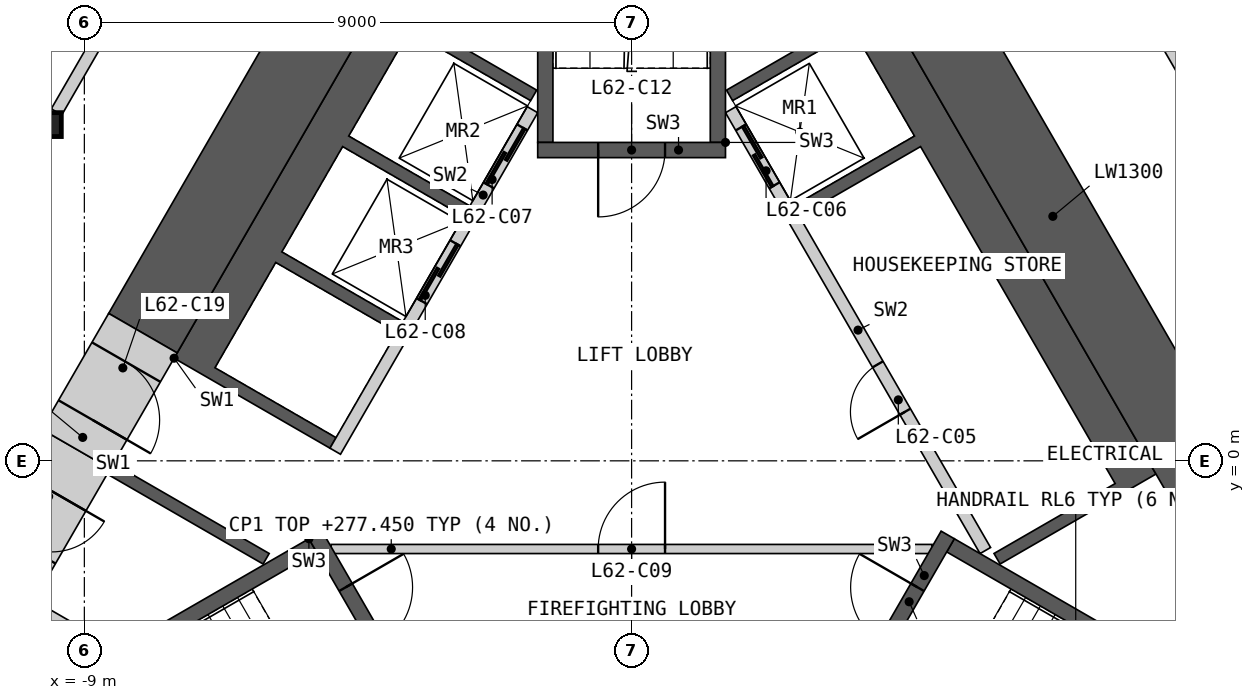
"""IFC4 building model, lengths in metres.
Left out: names, types, materials, properties, quantities, classifications, styles, units other than length and angle.
Written with IfcOpenShell. Run it as: python <this file> out.ifc"""

import sys

from ifc_helpers import new_model, si_unit, direction, frame, frame_2d, origin, origin_2d, place, context, subcontext, project, spatial, polyline, rectangle, i_section, outline, extrude, element, fill, save


model = new_model("IFC4")
c1 = context("Model", 3, precision=1e-05, world=origin(), true_north=direction((0.0, 1.0)))
c2 = subcontext(c1, "Body", "Model", "MODEL_VIEW")
j1 = project(units=[si_unit("LENGTHUNIT", "METRE"), si_unit("PLANEANGLEUNIT", "RADIAN")], contexts=[c1])
p1 = place(None, origin())
s1 = spatial("IfcSite", under=j1, at=p1, CompositionType="ELEMENT")
p2 = place(p1, origin())
s2 = spatial("IfcBuilding", under=s1, at=p2, CompositionType="ELEMENT")
p3 = place(p2, frame((0.0, 0.0, 274.2)))
s3 = spatial("IfcBuildingStorey", under=s2, at=p3, CompositionType="ELEMENT", Elevation=274.2)
p4 = place(p3, frame((-9.578, 5.53, 0.0), z_axis=(0.0, 0.0, 1.0), x_axis=(1.0, 0.0, 0.0)))
e1 = element("IfcColumn", 1, at=p4, inside=s3, PredefinedType="COLUMN", context=c2, shape_type="SweptSolid", body=[
    extrude(i_section(OverallWidth=0.399, OverallDepth=0.393, WebThickness=0.023, FlangeThickness=0.037, at=origin_2d()), origin(), (0.0, 0.0, 1.0), 3.6),
])
p5 = place(p3, origin())
e2 = element("IfcWall", 2, at=p5, inside=s3, PredefinedType="SHEAR", context=c2, shape_type="SweptSolid", body=[
    extrude(outline(polyline([(4.124, 7.577), (8.624, -0.217), (8.231, -0.444), (6.061, -1.697), (5.96, -1.524), (7.952, -0.374), (4.752, 5.169), (2.76, 4.019), (2.66, 4.192), (4.652, 5.342), (3.652, 7.074), (1.66, 5.924), (1.561, 6.097), (3.731, 7.35), (4.124, 7.577)])), origin(), (0.0, 0.0, 1.0), 3.25),
])
p6 = place(p3, frame((5.817, -1.476, 0.0), z_axis=(0.0, 0.0, 1.0), x_axis=(-0.500002616675, 0.866023893041, 0.0)))
e3 = element("IfcWall", 3, at=p6, inside=s3, PredefinedType="SOLIDWALL", context=c2, shape_type="SweptSolid", body=[
    extrude(rectangle(XDim=8.373, YDim=0.2, at=frame_2d((4.187, 0.0))), origin(), (0.0, 0.0, 1.0), 3.25),
])
p7 = place(p6, frame((2.637, 0.0, 0.0)))
e4 = element("IfcOpeningElement", 4, at=p7, cuts=e3, PredefinedType="OPENING", context=c2, shape_type="SweptSolid", body=[
    extrude(rectangle(XDim=0.9, YDim=2.1, at=frame_2d((0.45, 1.05))), frame((0.0, 0.11, 0.0), z_axis=(0.0, -1.0, 0.0), x_axis=(1.0, 0.0, 0.0)), (0.0, 0.0, 1.0), 0.22),
])
p8 = place(p6, frame((6.937, 0.0, 0.0)))
e5 = element("IfcOpeningElement", 5, at=p8, cuts=e3, PredefinedType="OPENING", context=c2, shape_type="SweptSolid", body=[
    extrude(rectangle(XDim=1.1, YDim=2.1, at=frame_2d((0.55, 1.05))), frame((0.0, 0.11, 0.0), z_axis=(0.0, -1.0, 0.0), x_axis=(1.0, 0.0, 0.0)), (0.0, 0.0, 1.0), 0.22),
])
p9 = place(p3, origin())
e6 = element("IfcWall", 6, at=p9, inside=s3, PredefinedType="SHEAR", context=c2, shape_type="SweptSolid", body=[
    extrude(outline(polyline([(-7.524, 1.688), (-4.124, 7.577), (-3.731, 7.35), (-1.561, 6.097), (-1.66, 5.924), (-3.652, 7.074), (-4.652, 5.342), (-2.66, 4.192), (-2.76, 4.019), (-4.752, 5.169), (-5.752, 3.437), (-3.76, 2.287), (-3.861, 2.113), (-5.852, 3.263), (-6.852, 1.531), (-4.861, 0.381), (-4.96, 0.208), (-7.131, 1.461), (-7.524, 1.688)])), origin(), (0.0, 0.0, 1.0), 3.25),
])
p10 = place(p3, origin())
e7 = element("IfcWall", 7, at=p10, inside=s3, PredefinedType="SHEAR", context=c2, shape_type="SweptSolid", body=[
    extrude(outline(polyline([(-8.524, -0.044), (-8.131, -0.271), (-5.96, -1.524), (-6.061, -1.697), (-8.231, -0.444), (-8.624, -0.217), (-8.524, -0.044)])), origin(), (0.0, 0.0, 1.0), 3.25),
])
p11 = place(p3, frame((-1.631, 5.776, 0.0), z_axis=(0.0, 0.0, 1.0), x_axis=(-0.499992876559, -0.866029516466, 0.0)))
e8 = element("IfcWall", 8, at=p11, inside=s3, PredefinedType="SOLIDWALL", context=c2, shape_type="SweptSolid", body=[
    extrude(rectangle(XDim=6.486, YDim=0.2, at=frame_2d((3.243, 0.0))), origin(), (0.0, 0.0, 1.0), 3.25),
])
p12 = place(p11, frame((0.337, 0.0, 0.0)))
e9 = element("IfcOpeningElement", 9, at=p12, cuts=e8, PredefinedType="OPENING", context=c2, shape_type="SweptSolid", body=[
    extrude(rectangle(XDim=1.1, YDim=2.1, at=frame_2d((0.55, 1.05))), frame((0.0, 0.11, 0.0), z_axis=(0.0, -1.0, 0.0), x_axis=(1.0, 0.0, 0.0)), (0.0, 0.0, 1.0), 0.22),
])
p13 = place(p11, frame((2.537, 0.0, 0.0)))
e10 = element("IfcOpeningElement", 10, at=p13, cuts=e8, PredefinedType="OPENING", context=c2, shape_type="SweptSolid", body=[
    extrude(rectangle(XDim=1.1, YDim=2.1, at=frame_2d((0.55, 1.05))), frame((0.0, 0.11, 0.0), z_axis=(0.0, -1.0, 0.0), x_axis=(1.0, 0.0, 0.0)), (0.0, 0.0, 1.0), 0.22),
])
p14 = place(p3, frame((-4.941, -1.45, 0.0), z_axis=(0.0, 0.0, 1.0), x_axis=(1.0, 0.0, 0.0)))
e11 = element("IfcWall", 11, at=p14, inside=s3, PredefinedType="PARTITIONING", context=c2, shape_type="SweptSolid", body=[
    extrude(rectangle(XDim=9.882, YDim=0.15, at=frame_2d((4.941, 0.0))), origin(), (0.0, 0.0, 1.0), 3.25),
])
p15 = place(p14, frame((4.391, 0.0, 0.0)))
e12 = element("IfcOpeningElement", 12, at=p15, cuts=e11, PredefinedType="OPENING", context=c2, shape_type="SweptSolid", body=[
    extrude(rectangle(XDim=1.1, YDim=2.1, at=frame_2d((0.55, 1.05))), frame((0.0, 0.085, 0.0), z_axis=(0.0, -1.0, 0.0), x_axis=(1.0, 0.0, 0.0)), (0.0, 0.0, 1.0), 0.17),
])
p16 = place(p3, origin())
e13 = element("IfcWall", 13, at=p16, inside=s3, PredefinedType="SHEAR", context=c2, shape_type="SweptSolid", body=[
    extrude(outline(polyline([(-5.307, -1.281), (-10.374, -4.206), (-10.032, -4.298), (-5.182, -1.498), (-5.307, -1.281)])), origin(), (0.0, 0.0, 1.0), 3.25),
])
p17 = place(p3, frame((-5.199, -1.219, 0.0), z_axis=(0.0, 0.0, 1.0), x_axis=(0.499982516597, -0.866035497597, 0.0)))
e14 = element("IfcWall", 14, at=p17, inside=s3, PredefinedType="SHEAR", context=c2, shape_type="SweptSolid", body=[
    extrude(rectangle(XDim=3.088, YDim=0.25, at=frame_2d((1.544, 0.0))), origin(), (0.0, 0.0, 1.0), 3.25),
])
p18 = place(p17, frame((0.994, 0.0, 0.0)))
e15 = element("IfcOpeningElement", 15, at=p18, cuts=e14, PredefinedType="OPENING", context=c2, shape_type="SweptSolid", body=[
    extrude(rectangle(XDim=1.1, YDim=2.1, at=frame_2d((0.55, 1.05))), frame((0.0, 0.135, 0.0), z_axis=(0.0, -1.0, 0.0), x_axis=(1.0, 0.0, 0.0)), (0.0, 0.0, 1.0), 0.27),
])
p19 = place(p3, origin())
e16 = element("IfcWall", 16, at=p19, inside=s3, PredefinedType="SHEAR", context=c2, shape_type="SweptSolid", body=[
    extrude(outline(polyline([(10.032, -4.298), (10.374, -4.206), (5.307, -1.281), (5.182, -1.498), (10.032, -4.298)])), origin(), (0.0, 0.0, 1.0), 3.25),
])
p20 = place(p3, frame((3.655, -3.893, 0.0), z_axis=(0.0, 0.0, 1.0), x_axis=(0.499982516597, 0.866035497597, 0.0)))
e17 = element("IfcWall", 17, at=p20, inside=s3, PredefinedType="SHEAR", context=c2, shape_type="SweptSolid", body=[
    extrude(rectangle(XDim=3.088, YDim=0.25, at=frame_2d((1.544, 0.0))), origin(), (0.0, 0.0, 1.0), 3.25),
])
p21 = place(p20, frame((0.994, 0.0, 0.0)))
e18 = element("IfcOpeningElement", 18, at=p21, cuts=e17, PredefinedType="OPENING", context=c2, shape_type="SweptSolid", body=[
    extrude(rectangle(XDim=1.1, YDim=2.1, at=frame_2d((0.55, 1.05))), frame((0.0, 0.135, 0.0), z_axis=(0.0, -1.0, 0.0), x_axis=(1.0, 0.0, 0.0)), (0.0, 0.0, 1.0), 0.27),
])
p22 = place(p3, origin())
e19 = element("IfcWall", 19, at=p22, inside=s3, PredefinedType="SHEAR", context=c2, shape_type="SweptSolid", body=[
    extrude(outline(polyline([(1.544, 5.237), (1.544, 11.087), (1.294, 10.837), (1.294, 5.237), (1.544, 5.237)])), origin(), (0.0, 0.0, 1.0), 3.25),
])
p23 = place(p3, origin())
e20 = element("IfcWall", 20, at=p23, inside=s3, PredefinedType="SHEAR", context=c2, shape_type="SweptSolid", body=[
    extrude(outline(polyline([(-1.294, 10.837), (-1.544, 11.087), (-1.544, 5.237), (-1.294, 5.237), (-1.294, 10.837)])), origin(), (0.0, 0.0, 1.0), 3.25),
])
p24 = place(p3, frame((1.544, 5.112, 0.0), z_axis=(0.0, 0.0, 1.0), x_axis=(-1.0, 0.0, 0.0)))
e21 = element("IfcWall", 21, at=p24, inside=s3, PredefinedType="SHEAR", context=c2, shape_type="SweptSolid", body=[
    extrude(rectangle(XDim=3.088, YDim=0.25, at=frame_2d((1.544, 0.0))), origin(), (0.0, 0.0, 1.0), 3.25),
])
p25 = place(p24, frame((0.994, 0.0, 0.0)))
e22 = element("IfcOpeningElement", 22, at=p25, cuts=e21, PredefinedType="OPENING", context=c2, shape_type="SweptSolid", body=[
    extrude(rectangle(XDim=1.1, YDim=2.1, at=frame_2d((0.55, 1.05))), frame((0.0, 0.135, 0.0), z_axis=(0.0, -1.0, 0.0), x_axis=(1.0, 0.0, 0.0)), (0.0, 0.0, 1.0), 0.27),
])
p26 = place(p3, frame((-9.862, -2.361, 0.0), z_axis=(0.0, 0.0, 1.0), x_axis=(0.865990094875, -0.500061151839, 0.0)))
e23 = element("IfcWall", 23, at=p26, inside=s3, PredefinedType="PARTITIONING", context=c2, shape_type="SweptSolid", body=[
    extrude(rectangle(XDim=1.56, YDim=0.15, at=frame_2d((0.78, 0.0))), origin(), (0.0, 0.0, 1.0), 3.25),
])
p27 = place(p3, frame((10.062, -1.408, 0.0), z_axis=(0.0, 0.0, 1.0), x_axis=(-0.500000545805, 0.866025088663, 0.0)))
e24 = element("IfcWall", 24, at=p27, inside=s3, PredefinedType="SHEAR", context=c2, shape_type="SweptSolid", body=[
    extrude(rectangle(XDim=12.539, YDim=1.3, at=frame_2d((6.27, 0.0))), origin(), (0.0, 0.0, 1.0), 3.25),
])
p28 = place(p3, frame((-3.812, 9.418, 0.0), z_axis=(0.0, 0.0, 1.0), x_axis=(-0.499995037753, -0.86602826872, 0.0)))
e25 = element("IfcWall", 25, at=p28, inside=s3, PredefinedType="SHEAR", context=c2, shape_type="SweptSolid", body=[
    extrude(rectangle(XDim=8.451, YDim=1.3, at=frame_2d((4.225, 0.0))), origin(), (0.0, 0.0, 1.0), 3.25),
])
p29 = place(p3, frame((-9.137, 0.195, 0.0), z_axis=(0.0, 0.0, 1.0), x_axis=(-0.500009943768, -0.866019662671, 0.0)))
e26 = element("IfcWall", 26, at=p29, inside=s3, PredefinedType="SHEAR", context=c2, shape_type="SweptSolid", body=[
    extrude(rectangle(XDim=2.401, YDim=1.3, at=frame_2d((1.201, 0.0))), origin(), (0.0, 0.0, 1.0), 3.25),
])
p30 = place(p29, frame((0.8, 0.0, 0.0)))
e27 = element("IfcOpeningElement", 27, at=p30, cuts=e26, PredefinedType="OPENING", context=c2, shape_type="SweptSolid", body=[
    extrude(rectangle(XDim=1.0, YDim=2.1, at=frame_2d((0.5, 1.05))), frame((0.0, 0.66, 0.0), z_axis=(0.0, -1.0, 0.0), x_axis=(1.0, 0.0, 0.0)), (0.0, 0.0, 1.0), 1.32),
])
p31 = place(p3, frame((-8.037, 2.1, 0.0), z_axis=(0.0, 0.0, 1.0), x_axis=(-0.50002983664, -0.866008176907, 0.0)))
e28 = element("IfcWall", 28, at=p31, inside=s3, PredefinedType="SHEAR", context=c2, shape_type="SweptSolid", body=[
    extrude(rectangle(XDim=2.2, YDim=1.3, at=frame_2d((1.1, 0.0))), origin(), (0.0, 0.0, 1.0), 3.25),
])
p32 = place(p31, frame((0.55, 0.0, 0.0)))
e29 = element("IfcOpeningElement", 29, at=p32, cuts=e28, PredefinedType="OPENING", context=c2, shape_type="SweptSolid", body=[
    extrude(rectangle(XDim=1.1, YDim=2.1, at=frame_2d((0.55, 1.05))), frame((0.0, 0.66, 0.0), z_axis=(0.0, -1.0, 0.0), x_axis=(1.0, 0.0, 0.0)), (0.0, 0.0, 1.0), 1.32),
])
for number, where, z_axis, x_axis in (
    (30, (4.91, 13.616, 0.0), (0.0, 0.0, 1.0), (0.5, -0.866, 0.0)),
    (31, (-9.458, 5.74, 0.0), (0.0, 0.0, 1.0), (0.5, 0.866, 0.0)),
):
    element("IfcWall", number, at=place(p3, frame(where, z_axis=z_axis, x_axis=x_axis)), inside=s3, PredefinedType="PARTITIONING", context=c2, shape_type="SweptSolid", body=[
        extrude(rectangle(XDim=9.095, YDim=0.2, at=frame_2d((4.547, 0.0))), origin(), (0.0, 0.0, 1.0), 3.25),
    ])
p33 = place(p7, origin())
e32 = element("IfcDoor", 32, at=p33, inside=s3, OperationType="SINGLE_SWING_LEFT", PredefinedType="DOOR", context=c2, shape_type="SweptSolid", body=[
    extrude(rectangle(XDim=0.9, YDim=2.1, at=frame_2d((0.45, 1.05))), frame((0.0, 0.025, 0.0), z_axis=(0.0, -1.0, 0.0), x_axis=(1.0, 0.0, 0.0)), (0.0, 0.0, 1.0), 0.05),
])
fill(e4, e32)
p34 = place(p8, origin())
e33 = element("IfcDoor", 33, at=p34, inside=s3, OperationType="SLIDING_TO_LEFT", PredefinedType="DOOR", context=c2, shape_type="SweptSolid", body=[
    extrude(rectangle(XDim=1.1, YDim=2.1, at=frame_2d((0.55, 1.05))), frame((0.0, 0.025, 0.0), z_axis=(0.0, -1.0, 0.0), x_axis=(1.0, 0.0, 0.0)), (0.0, 0.0, 1.0), 0.05),
])
fill(e5, e33)
p35 = place(p12, origin())
e34 = element("IfcDoor", 34, at=p35, inside=s3, OperationType="SLIDING_TO_LEFT", PredefinedType="DOOR", context=c2, shape_type="SweptSolid", body=[
    extrude(rectangle(XDim=1.1, YDim=2.1, at=frame_2d((0.55, 1.05))), frame((0.0, 0.025, 0.0), z_axis=(0.0, -1.0, 0.0), x_axis=(1.0, 0.0, 0.0)), (0.0, 0.0, 1.0), 0.05),
])
fill(e9, e34)
p36 = place(p13, origin())
e35 = element("IfcDoor", 35, at=p36, inside=s3, OperationType="SLIDING_TO_LEFT", PredefinedType="DOOR", context=c2, shape_type="SweptSolid", body=[
    extrude(rectangle(XDim=1.1, YDim=2.1, at=frame_2d((0.55, 1.05))), frame((0.0, 0.025, 0.0), z_axis=(0.0, -1.0, 0.0), x_axis=(1.0, 0.0, 0.0)), (0.0, 0.0, 1.0), 0.05),
])
fill(e10, e35)
p37 = place(p15, origin())
e36 = element("IfcDoor", 36, at=p37, inside=s3, OperationType="SINGLE_SWING_RIGHT", PredefinedType="DOOR", context=c2, shape_type="SweptSolid", body=[
    extrude(rectangle(XDim=1.1, YDim=2.1, at=frame_2d((0.55, 1.05))), frame((0.0, 0.025, 0.0), z_axis=(0.0, -1.0, 0.0), x_axis=(1.0, 0.0, 0.0)), (0.0, 0.0, 1.0), 0.05),
])
fill(e12, e36)
p38 = place(p18, origin())
e37 = element("IfcDoor", 37, at=p38, inside=s3, OperationType="SINGLE_SWING_LEFT", PredefinedType="DOOR", context=c2, shape_type="SweptSolid", body=[
    extrude(rectangle(XDim=1.1, YDim=2.1, at=frame_2d((0.55, 1.05))), frame((0.0, 0.025, 0.0), z_axis=(0.0, -1.0, 0.0), x_axis=(1.0, 0.0, 0.0)), (0.0, 0.0, 1.0), 0.05),
])
fill(e15, e37)
p39 = place(p21, origin())
e38 = element("IfcDoor", 38, at=p39, inside=s3, OperationType="SINGLE_SWING_RIGHT", PredefinedType="DOOR", context=c2, shape_type="SweptSolid", body=[
    extrude(rectangle(XDim=1.1, YDim=2.1, at=frame_2d((0.55, 1.05))), frame((0.0, 0.025, 0.0), z_axis=(0.0, -1.0, 0.0), x_axis=(1.0, 0.0, 0.0)), (0.0, 0.0, 1.0), 0.05),
])
fill(e18, e38)
p40 = place(p25, origin())
e39 = element("IfcDoor", 39, at=p40, inside=s3, OperationType="SINGLE_SWING_RIGHT", PredefinedType="DOOR", context=c2, shape_type="SweptSolid", body=[
    extrude(rectangle(XDim=1.1, YDim=2.1, at=frame_2d((0.55, 1.05))), frame((0.0, 0.025, 0.0), z_axis=(0.0, -1.0, 0.0), x_axis=(1.0, 0.0, 0.0)), (0.0, 0.0, 1.0), 0.05),
])
fill(e22, e39)
p41 = place(p30, origin())
e40 = element("IfcDoor", 40, at=p41, inside=s3, OperationType="SINGLE_SWING_LEFT", PredefinedType="DOOR", context=c2, shape_type="SweptSolid", body=[
    extrude(rectangle(XDim=1.0, YDim=2.1, at=frame_2d((0.5, 1.05))), frame((0.0, 0.405, 0.0), z_axis=(0.0, -1.0, 0.0), x_axis=(1.0, 0.0, 0.0)), (0.0, 0.0, 1.0), 0.05),
])
fill(e27, e40)
p42 = place(p32, origin())
e41 = element("IfcDoor", 41, at=p42, inside=s3, OperationType="SINGLE_SWING_RIGHT", PredefinedType="DOOR", context=c2, shape_type="SweptSolid", body=[
    extrude(rectangle(XDim=1.1, YDim=2.1, at=frame_2d((0.55, 1.05))), frame((0.0, 0.405, 0.0), z_axis=(0.0, -1.0, 0.0), x_axis=(1.0, 0.0, 0.0)), (0.0, 0.0, 1.0), 0.05),
])
fill(e29, e41)
save(model, sys.argv[1])
